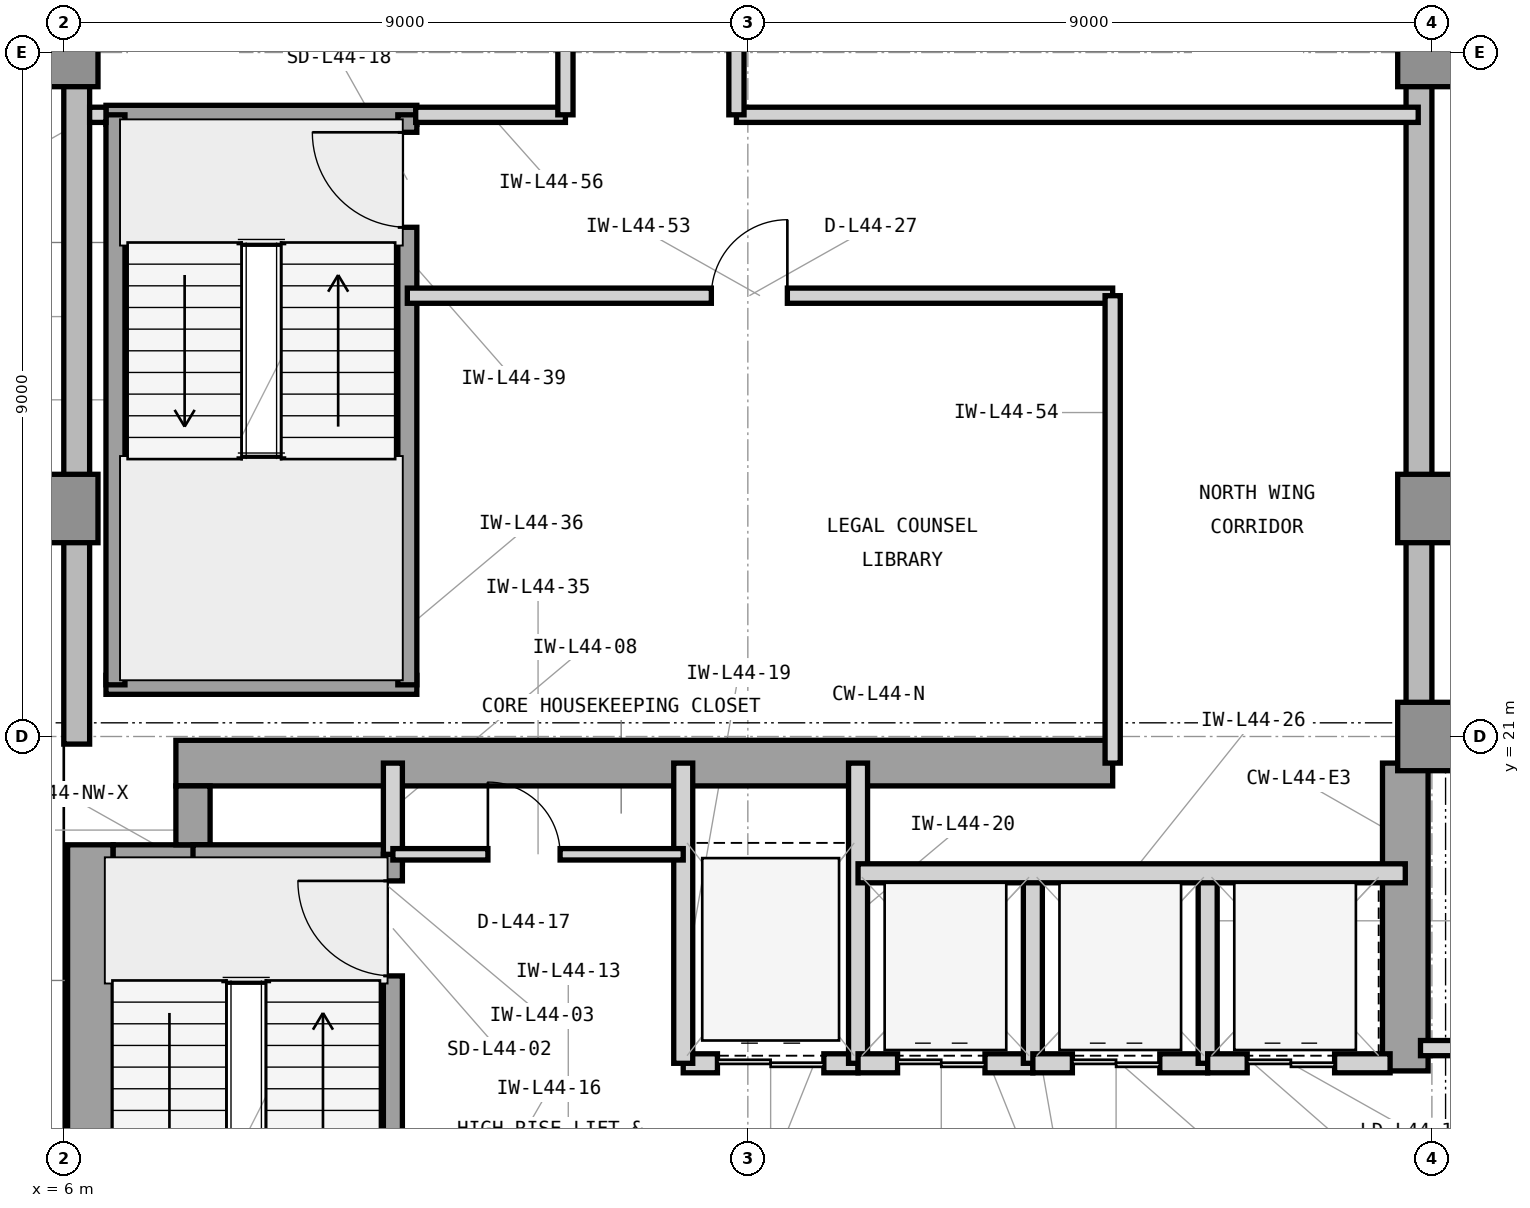
"""IFC4 building model, lengths in metres.
Left out: names, types, materials, properties, quantities, classifications, styles, units other than length and angle.
Written with IfcOpenShell. Run it as: python <this file> out.ifc"""

import sys

from ifc_helpers import new_model, si_unit, direction, frame, frame_2d, origin, origin_2d, place, context, subcontext, project, spatial, rectangle, extrude, element, fill, save


model = new_model("IFC4")
c1 = context("Model", 3, precision=1e-05, world=origin(), true_north=direction((0.0, 1.0)))
c2 = subcontext(c1, "Body", "Model", "MODEL_VIEW")
j1 = project(units=[si_unit("LENGTHUNIT", "METRE"), si_unit("PLANEANGLEUNIT", "RADIAN")], contexts=[c1])
p1 = place(None, origin())
s1 = spatial("IfcSite", under=j1, at=p1, CompositionType="ELEMENT")
p2 = place(p1, origin())
s2 = spatial("IfcBuilding", under=s1, at=p2, CompositionType="ELEMENT")
p3 = place(p2, frame((0.0, 0.0, 183.9)))
s3 = spatial("IfcBuildingStorey", under=s2, at=p3, CompositionType="ELEMENT", Elevation=183.9)
p4 = place(p3, frame((6.35, 4.425, 0.0), z_axis=(0.0, 0.0, 1.0), x_axis=(0.0, 1.0, 0.0)))
e1 = element("IfcWall", 1, at=p4, inside=s3, PredefinedType="SHEAR", context=c2, shape_type="SweptSolid", body=[
    extrude(rectangle(XDim=15.15, YDim=0.6, at=frame_2d((7.575, 0.0))), origin(), (0.0, 0.0, 1.0), 3.9),
])
p5 = place(p3, frame((7.475, 20.65, 0.0), z_axis=(0.0, 0.0, 1.0), x_axis=(1.0, 0.0, 0.0)))
e2 = element("IfcWall", 2, at=p5, inside=s3, PredefinedType="SHEAR", context=c2, shape_type="SweptSolid", body=[
    extrude(rectangle(XDim=12.325, YDim=0.6, at=frame_2d((6.163, 0.0))), origin(), (0.0, 0.0, 1.0), 3.9),
])
p6 = place(p3, frame((23.65, 16.6, 0.0), z_axis=(0.0, 0.0, 1.0), x_axis=(0.0, 1.0, 0.0)))
e3 = element("IfcWall", 3, at=p6, inside=s3, PredefinedType="SHEAR", context=c2, shape_type="SweptSolid", body=[
    extrude(rectangle(XDim=4.05, YDim=0.6, at=frame_2d((2.025, 0.0))), origin(), (0.0, 0.0, 1.0), 3.9),
])
p7 = place(p3, frame((6.65, 19.35, 0.0), z_axis=(0.0, 0.0, 1.0), x_axis=(1.0, 0.0, 0.0)))
e4 = element("IfcWall", 4, at=p7, inside=s3, PredefinedType="SHEAR", context=c2, shape_type="SweptSolid", body=[
    extrude(rectangle(XDim=1.275, YDim=0.45, at=frame_2d((0.638, 0.0))), origin(), (0.0, 0.0, 1.0), 3.9),
])
p8 = place(p3, frame((7.7, 19.575, 0.0), z_axis=(0.0, 0.0, 1.0), x_axis=(0.0, 1.0, 0.0)))
e5 = element("IfcWall", 5, at=p8, inside=s3, PredefinedType="SHEAR", context=c2, shape_type="SweptSolid", body=[
    extrude(rectangle(XDim=0.775, YDim=0.45, at=frame_2d((0.388, 0.0))), origin(), (0.0, 0.0, 1.0), 3.9),
])
for number, where, z_axis, x_axis in (
    (6, (24.0, 21.0, 0.0), (0.0, 0.0, 1.0), (1.0, 0.0, 0.0)),
    (7, (6.0, 24.0, 0.0), (0.0, 0.0, 1.0), (1.0, 0.0, 0.0)),
    (8, (24.0, 24.0, 0.0), (0.0, 0.0, 1.0), (1.0, 0.0, 0.0)),
    (9, (6.0, 30.0, 0.0), (0.0, 0.0, 1.0), (1.0, 0.0, 0.0)),
    (10, (24.0, 30.0, 0.0), (0.0, 0.0, 1.0), (1.0, 0.0, 0.0)),
):
    element("IfcColumn", number, at=place(p3, frame(where, z_axis=z_axis, x_axis=x_axis)), inside=s3, PredefinedType="COLUMN", context=c2, shape_type="SweptSolid", body=[
        extrude(rectangle(XDim=0.9, YDim=0.9, at=origin_2d()), origin(), (0.0, 0.0, 1.0), 3.9),
    ])
p9 = place(p3, frame((55.4, 20.83, 0.0), z_axis=(0.0, 0.0, 1.0), x_axis=(-1.0, 0.0, 0.0)))
e11 = element("IfcWall", 11, at=p9, inside=s3, PredefinedType="STANDARD", context=c2, shape_type="SweptSolid", body=[
    extrude(rectangle(XDim=31.4, YDim=0.34, at=frame_2d((15.7, 0.0))), origin(), (0.0, 0.0, 1.0), 3.7),
])
p10 = place(p9, frame((29.046, 0.0, 0.9)))
e12 = element("IfcOpeningElement", 12, at=p10, cuts=e11, PredefinedType="OPENING", context=c2, shape_type="SweptSolid", body=[
    extrude(rectangle(XDim=1.6, YDim=2.2, at=frame_2d((0.8, 1.1))), frame((0.0, 0.18, 0.0), z_axis=(0.0, -1.0, 0.0), x_axis=(1.0, 0.0, 0.0)), (0.0, 0.0, 1.0), 0.36),
])
p11 = place(p9, frame((10.125, 0.0, 0.9)))
e13 = element("IfcOpeningElement", 13, at=p11, cuts=e11, PredefinedType="OPENING", context=c2, shape_type="SweptSolid", body=[
    extrude(rectangle(XDim=2.3, YDim=2.2, at=frame_2d((1.15, 1.1))), frame((0.0, 0.18, 0.0), z_axis=(0.0, -1.0, 0.0), x_axis=(1.0, 0.0, 0.0)), (0.0, 0.0, 1.0), 0.36),
])
p12 = place(p3, frame((23.83, 21.0, 0.0), z_axis=(0.0, 0.0, 1.0), x_axis=(0.0, 1.0, 0.0)))
e14 = element("IfcWall", 14, at=p12, inside=s3, PredefinedType="STANDARD", context=c2, shape_type="SweptSolid", body=[
    extrude(rectangle(XDim=22.4, YDim=0.34, at=frame_2d((11.2, 0.0))), origin(), (0.0, 0.0, 1.0), 3.7),
])
p13 = place(p12, frame((10.955, 0.0, 0.9)))
e15 = element("IfcOpeningElement", 15, at=p13, cuts=e14, PredefinedType="OPENING", context=c2, shape_type="SweptSolid", body=[
    extrude(rectangle(XDim=2.3, YDim=2.2, at=frame_2d((1.15, 1.1))), frame((0.0, 0.18, 0.0), z_axis=(0.0, -1.0, 0.0), x_axis=(1.0, 0.0, 0.0)), (0.0, 0.0, 1.0), 0.36),
])
p14 = place(p3, frame((6.17, 43.4, 0.0), z_axis=(0.0, 0.0, 1.0), x_axis=(0.0, -1.0, 0.0)))
e16 = element("IfcWall", 16, at=p14, inside=s3, PredefinedType="STANDARD", context=c2, shape_type="SweptSolid", body=[
    extrude(rectangle(XDim=22.5, YDim=0.34, at=frame_2d((11.25, 0.0))), origin(), (0.0, 0.0, 1.0), 3.7),
])
p15 = place(p14, frame((10.1, 0.0, 0.9)))
e17 = element("IfcOpeningElement", 17, at=p15, cuts=e16, PredefinedType="OPENING", context=c2, shape_type="SweptSolid", body=[
    extrude(rectangle(XDim=2.3, YDim=2.2, at=frame_2d((1.15, 1.1))), frame((0.0, 0.18, 0.0), z_axis=(0.0, -1.0, 0.0), x_axis=(1.0, 0.0, 0.0)), (0.0, 0.0, 1.0), 0.36),
])
p16 = place(p3, frame((7.7, 19.45, 0.0), z_axis=(0.0, 0.0, 1.0), x_axis=(1.0, 0.0, 0.0)))
e18 = element("IfcWall", 18, at=p16, inside=s3, PredefinedType="SHEAR", context=c2, shape_type="SweptSolid", body=[
    extrude(rectangle(XDim=2.755, YDim=0.25, at=frame_2d((1.377, 0.0))), origin(), (0.0, 0.0, 1.0), 3.9),
])
p17 = place(p3, frame((10.33, 12.0, 0.0), z_axis=(0.0, 0.0, 1.0), x_axis=(0.0, 1.0, 0.0)))
e19 = element("IfcWall", 19, at=p17, inside=s3, PredefinedType="SHEAR", context=c2, shape_type="SweptSolid", body=[
    extrude(rectangle(XDim=7.45, YDim=0.25, at=frame_2d((3.725, 0.0))), origin(), (0.0, 0.0, 1.0), 3.9),
])
p18 = place(p17, frame((5.85, 0.0, 0.0)))
e20 = element("IfcOpeningElement", 20, at=p18, cuts=e19, PredefinedType="OPENING", context=c2, shape_type="SweptSolid", body=[
    extrude(rectangle(XDim=1.25, YDim=2.2, at=frame_2d((0.625, 1.1))), frame((0.0, 0.135, 0.0), z_axis=(0.0, -1.0, 0.0), x_axis=(1.0, 0.0, 0.0)), (0.0, 0.0, 1.0), 0.27),
])
p19 = place(p3, frame((10.33, 19.45, 0.0), z_axis=(0.0, 0.0, 1.0), x_axis=(0.0, 1.0, 0.0)))
e21 = element("IfcWall", 21, at=p19, inside=s3, PredefinedType="PARTITIONING", context=c2, shape_type="SweptSolid", body=[
    extrude(rectangle(XDim=1.2, YDim=0.25, at=frame_2d((0.6, 0.0))), origin(), (0.0, 0.0, 1.0), 3.073),
])
p20 = place(p3, frame((14.15, 16.7, 0.0), z_axis=(0.0, 0.0, 1.0), x_axis=(1.0, 0.0, 0.0)))
e22 = element("IfcWall", 22, at=p20, inside=s3, PredefinedType="PARTITIONING", context=c2, shape_type="SweptSolid", body=[
    extrude(rectangle(XDim=2.3, YDim=0.25, at=frame_2d((1.15, 0.0))), origin(), (0.0, 0.0, 1.0), 3.283),
])
p21 = place(p20, frame((0.45, 0.0, 0.0)))
e23 = element("IfcOpeningElement", 23, at=p21, cuts=e22, PredefinedType="OPENING", context=c2, shape_type="SweptSolid", body=[
    extrude(rectangle(XDim=1.4, YDim=2.35, at=frame_2d((0.7, 1.175))), frame((0.0, 0.135, 0.0), z_axis=(0.0, -1.0, 0.0), x_axis=(1.0, 0.0, 0.0)), (0.0, 0.0, 1.0), 0.27),
])
for number, where, z_axis, x_axis in (
    (24, (14.15, 16.7, 0.0), (0.0, 0.0, 1.0), (0.0, 1.0, 0.0)),
    (25, (16.45, 16.7, 0.0), (0.0, 0.0, 1.0), (0.0, 1.0, 0.0)),
):
    element("IfcWall", number, at=place(p3, frame(where, z_axis=z_axis, x_axis=x_axis)), inside=s3, PredefinedType="PARTITIONING", context=c2, shape_type="SweptSolid", body=[
        extrude(rectangle(XDim=3.95, YDim=0.25, at=frame_2d((1.975, 0.0))), origin(), (0.0, 0.0, 1.0), 3.69),
    ])
p22 = place(p3, frame((16.45, 16.7, 0.0), z_axis=(0.0, 0.0, 1.0), x_axis=(1.0, 0.0, 0.0)))
e26 = element("IfcWall", 26, at=p22, inside=s3, PredefinedType="PARTITIONING", context=c2, shape_type="SweptSolid", body=[
    extrude(rectangle(XDim=2.3, YDim=0.25, at=frame_2d((1.15, 0.0))), origin(), (0.0, 0.0, 1.0), 3.283),
])
p23 = place(p22, frame((0.52, 0.0, 0.0)))
e27 = element("IfcOpeningElement", 27, at=p23, cuts=e26, PredefinedType="OPENING", context=c2, shape_type="SweptSolid", body=[
    extrude(rectangle(XDim=1.15, YDim=2.25, at=frame_2d((0.575, 1.125))), frame((0.0, 0.135, 0.0), z_axis=(0.0, -1.0, 0.0), x_axis=(1.0, 0.0, 0.0)), (0.0, 0.0, 1.0), 0.27),
])
p24 = place(p3, frame((18.75, 16.7, 0.0), z_axis=(0.0, 0.0, 1.0), x_axis=(0.0, 1.0, 0.0)))
e28 = element("IfcWall", 28, at=p24, inside=s3, PredefinedType="PARTITIONING", context=c2, shape_type="SweptSolid", body=[
    extrude(rectangle(XDim=2.5, YDim=0.25, at=frame_2d((1.25, 0.0))), origin(), (0.0, 0.0, 1.0), 3.69),
])
p25 = place(p3, frame((18.75, 16.7, 0.0), z_axis=(0.0, 0.0, 1.0), x_axis=(1.0, 0.0, 0.0)))
e29 = element("IfcWall", 29, at=p25, inside=s3, PredefinedType="PARTITIONING", context=c2, shape_type="SweptSolid", body=[
    extrude(rectangle(XDim=2.3, YDim=0.25, at=frame_2d((1.15, 0.0))), origin(), (0.0, 0.0, 1.0), 3.283),
])
p26 = place(p25, frame((0.52, 0.0, 0.0)))
e30 = element("IfcOpeningElement", 30, at=p26, cuts=e29, PredefinedType="OPENING", context=c2, shape_type="SweptSolid", body=[
    extrude(rectangle(XDim=1.15, YDim=2.25, at=frame_2d((0.575, 1.125))), frame((0.0, 0.135, 0.0), z_axis=(0.0, -1.0, 0.0), x_axis=(1.0, 0.0, 0.0)), (0.0, 0.0, 1.0), 0.27),
])
p27 = place(p3, frame((21.05, 16.7, 0.0), z_axis=(0.0, 0.0, 1.0), x_axis=(0.0, 1.0, 0.0)))
e31 = element("IfcWall", 31, at=p27, inside=s3, PredefinedType="PARTITIONING", context=c2, shape_type="SweptSolid", body=[
    extrude(rectangle(XDim=2.5, YDim=0.25, at=frame_2d((1.25, 0.0))), origin(), (0.0, 0.0, 1.0), 3.69),
])
p28 = place(p3, frame((21.05, 16.7, 0.0), z_axis=(0.0, 0.0, 1.0), x_axis=(1.0, 0.0, 0.0)))
e32 = element("IfcWall", 32, at=p28, inside=s3, PredefinedType="PARTITIONING", context=c2, shape_type="SweptSolid", body=[
    extrude(rectangle(XDim=2.4, YDim=0.25, at=frame_2d((1.2, 0.0))), origin(), (0.0, 0.0, 1.0), 3.283),
])
p29 = place(p28, frame((0.52, 0.0, 0.0)))
e33 = element("IfcOpeningElement", 33, at=p29, cuts=e32, PredefinedType="OPENING", context=c2, shape_type="SweptSolid", body=[
    extrude(rectangle(XDim=1.15, YDim=2.25, at=frame_2d((0.575, 1.125))), frame((0.0, 0.135, 0.0), z_axis=(0.0, -1.0, 0.0), x_axis=(1.0, 0.0, 0.0)), (0.0, 0.0, 1.0), 0.27),
])
p30 = place(p3, frame((16.45, 19.2, 0.0), z_axis=(0.0, 0.0, 1.0), x_axis=(1.0, 0.0, 0.0)))
e34 = element("IfcWall", 34, at=p30, inside=s3, PredefinedType="PARTITIONING", context=c2, shape_type="SweptSolid", body=[
    extrude(rectangle(XDim=7.2, YDim=0.25, at=frame_2d((3.6, 0.0))), origin(), (0.0, 0.0, 1.0), 3.69),
])
p31 = place(p3, frame((10.33, 19.45, 0.0), z_axis=(0.0, 0.0, 1.0), x_axis=(1.0, 0.0, 0.0)))
e35 = element("IfcWall", 35, at=p31, inside=s3, PredefinedType="PARTITIONING", context=c2, shape_type="SweptSolid", body=[
    extrude(rectangle(XDim=3.82, YDim=0.15, at=frame_2d((1.91, 0.0))), origin(), (0.0, 0.0, 1.0), 3.69),
])
p32 = place(p31, frame((1.25, 0.0, 0.0)))
e36 = element("IfcOpeningElement", 36, at=p32, cuts=e35, PredefinedType="OPENING", context=c2, shape_type="SweptSolid", body=[
    extrude(rectangle(XDim=0.95, YDim=2.1, at=frame_2d((0.475, 1.05))), frame((0.0, 0.085, 0.0), z_axis=(0.0, -1.0, 0.0), x_axis=(1.0, 0.0, 0.0)), (0.0, 0.0, 1.0), 0.17),
])
for number, where, z_axis, x_axis in (
    (37, (6.555, 21.68, 0.0), (0.0, 0.0, 1.0), (1.0, 0.0, 0.0)),
    (38, (6.555, 29.18, 0.0), (0.0, 0.0, 1.0), (1.0, 0.0, 0.0)),
):
    element("IfcWall", number, at=place(p3, frame(where, z_axis=z_axis, x_axis=x_axis)), inside=s3, PredefinedType="SHEAR", context=c2, shape_type="SweptSolid", body=[
        extrude(rectangle(XDim=4.09, YDim=0.25, at=frame_2d((2.045, 0.0))), origin(), (0.0, 0.0, 1.0), 3.9),
    ])
p33 = place(p3, frame((6.68, 21.68, 0.0), z_axis=(0.0, 0.0, 1.0), x_axis=(0.0, 1.0, 0.0)))
e39 = element("IfcWall", 39, at=p33, inside=s3, PredefinedType="SHEAR", context=c2, shape_type="SweptSolid", body=[
    extrude(rectangle(XDim=7.5, YDim=0.25, at=frame_2d((3.75, 0.0))), origin(), (0.0, 0.0, 1.0), 3.9),
])
p34 = place(p3, frame((10.52, 21.68, 0.0), z_axis=(0.0, 0.0, 1.0), x_axis=(0.0, 1.0, 0.0)))
e40 = element("IfcWall", 40, at=p34, inside=s3, PredefinedType="SHEAR", context=c2, shape_type="SweptSolid", body=[
    extrude(rectangle(XDim=7.5, YDim=0.25, at=frame_2d((3.75, 0.0))), origin(), (0.0, 0.0, 1.0), 3.9),
])
p35 = place(p34, frame((6.02, 0.0, 0.0)))
e41 = element("IfcOpeningElement", 41, at=p35, cuts=e40, PredefinedType="OPENING", context=c2, shape_type="SweptSolid", body=[
    extrude(rectangle(XDim=1.25, YDim=2.2, at=frame_2d((0.625, 1.1))), frame((0.0, 0.135, 0.0), z_axis=(0.0, -1.0, 0.0), x_axis=(1.0, 0.0, 0.0)), (0.0, 0.0, 1.0), 0.27),
])
p36 = place(p3, frame((23.85, 16.9, 0.0), z_axis=(0.0, 0.0, 1.0), x_axis=(1.0, 0.0, 0.0)))
e42 = element("IfcWall", 42, at=p36, inside=s3, PredefinedType="PARTITIONING", context=c2, shape_type="SweptSolid", body=[
    extrude(rectangle(XDim=2.85, YDim=0.2, at=frame_2d((1.425, 0.0))), origin(), (0.0, 0.0, 1.0), 3.69),
])
p37 = place(p36, frame((0.7, 0.0, 0.0)))
e43 = element("IfcOpeningElement", 43, at=p37, cuts=e42, PredefinedType="OPENING", context=c2, shape_type="SweptSolid", body=[
    extrude(rectangle(XDim=1.0, YDim=2.15, at=frame_2d((0.5, 1.075))), frame((0.0, 0.11, 0.0), z_axis=(0.0, -1.0, 0.0), x_axis=(1.0, 0.0, 0.0)), (0.0, 0.0, 1.0), 0.22),
])
p38 = place(p3, frame((10.52, 26.8, 0.0), z_axis=(0.0, 0.0, 1.0), x_axis=(1.0, 0.0, 0.0)))
e44 = element("IfcWall", 44, at=p38, inside=s3, PredefinedType="PARTITIONING", context=c2, shape_type="SweptSolid", body=[
    extrude(rectangle(XDim=9.28, YDim=0.2, at=frame_2d((4.64, 0.0))), origin(), (0.0, 0.0, 1.0), 3.69),
])
p39 = place(p38, frame((4.0, 0.0, 0.0)))
e45 = element("IfcOpeningElement", 45, at=p39, cuts=e44, PredefinedType="OPENING", context=c2, shape_type="SweptSolid", body=[
    extrude(rectangle(XDim=1.0, YDim=2.15, at=frame_2d((0.5, 1.075))), frame((0.0, 0.11, 0.0), z_axis=(0.0, -1.0, 0.0), x_axis=(1.0, 0.0, 0.0)), (0.0, 0.0, 1.0), 0.22),
])
p40 = place(p3, frame((19.8, 20.65, 0.0), z_axis=(0.0, 0.0, 1.0), x_axis=(0.0, 1.0, 0.0)))
e46 = element("IfcWall", 46, at=p40, inside=s3, PredefinedType="PARTITIONING", context=c2, shape_type="SweptSolid", body=[
    extrude(rectangle(XDim=6.15, YDim=0.2, at=frame_2d((3.075, 0.0))), origin(), (0.0, 0.0, 1.0), 3.69),
])
p41 = place(p3, frame((6.34, 29.18, 0.0), z_axis=(0.0, 0.0, 1.0), x_axis=(1.0, 0.0, 0.0)))
e47 = element("IfcWall", 47, at=p41, inside=s3, PredefinedType="PARTITIONING", context=c2, shape_type="SweptSolid", body=[
    extrude(rectangle(XDim=0.215, YDim=0.2, at=frame_2d((0.107, 0.0))), origin(), (0.0, 0.0, 1.0), 3.69),
])
p42 = place(p3, frame((10.63, 29.18, 0.0), z_axis=(0.0, 0.0, 1.0), x_axis=(1.0, 0.0, 0.0)))
e48 = element("IfcWall", 48, at=p42, inside=s3, PredefinedType="PARTITIONING", context=c2, shape_type="SweptSolid", body=[
    extrude(rectangle(XDim=1.97, YDim=0.2, at=frame_2d((0.985, 0.0))), origin(), (0.0, 0.0, 1.0), 3.69),
])
p43 = place(p3, frame((14.85, 29.18, 0.0), z_axis=(0.0, 0.0, 1.0), x_axis=(1.0, 0.0, 0.0)))
e49 = element("IfcWall", 49, at=p43, inside=s3, PredefinedType="PARTITIONING", context=c2, shape_type="SweptSolid", body=[
    extrude(rectangle(XDim=8.97, YDim=0.2, at=frame_2d((4.485, 0.0))), origin(), (0.0, 0.0, 1.0), 3.69),
])
p44 = place(p3, frame((12.6, 29.18, 0.0), z_axis=(0.0, 0.0, 1.0), x_axis=(0.0, 1.0, 0.0)))
e50 = element("IfcWall", 50, at=p44, inside=s3, PredefinedType="PARTITIONING", context=c2, shape_type="SweptSolid", body=[
    extrude(rectangle(XDim=7.82, YDim=0.2, at=frame_2d((3.91, 0.0))), origin(), (0.0, 0.0, 1.0), 3.69),
])
p45 = place(p44, frame((3.41, 0.0, 0.0)))
e51 = element("IfcOpeningElement", 51, at=p45, cuts=e50, PredefinedType="OPENING", context=c2, shape_type="SweptSolid", body=[
    extrude(rectangle(XDim=1.0, YDim=2.15, at=frame_2d((0.5, 1.075))), frame((0.0, 0.11, 0.0), z_axis=(0.0, -1.0, 0.0), x_axis=(1.0, 0.0, 0.0)), (0.0, 0.0, 1.0), 0.22),
])
p46 = place(p3, frame((14.85, 29.18, 0.0), z_axis=(0.0, 0.0, 1.0), x_axis=(0.0, 1.0, 0.0)))
e52 = element("IfcWall", 52, at=p46, inside=s3, PredefinedType="PARTITIONING", context=c2, shape_type="SweptSolid", body=[
    extrude(rectangle(XDim=7.82, YDim=0.2, at=frame_2d((3.91, 0.0))), origin(), (0.0, 0.0, 1.0), 3.69),
])
p47 = place(p46, frame((3.41, 0.0, 0.0)))
e53 = element("IfcOpeningElement", 53, at=p47, cuts=e52, PredefinedType="OPENING", context=c2, shape_type="SweptSolid", body=[
    extrude(rectangle(XDim=1.0, YDim=2.15, at=frame_2d((0.5, 1.075))), frame((0.0, 0.11, 0.0), z_axis=(0.0, -1.0, 0.0), x_axis=(1.0, 0.0, 0.0)), (0.0, 0.0, 1.0), 0.22),
])
p48 = place(p18, origin())
e54 = element("IfcDoor", 54, at=p48, inside=s3, OperationType="SINGLE_SWING_RIGHT", PredefinedType="DOOR", context=c2, shape_type="SweptSolid", body=[
    extrude(rectangle(XDim=1.25, YDim=2.2, at=frame_2d((0.625, 1.1))), frame((0.0, 0.025, 0.0), z_axis=(0.0, -1.0, 0.0), x_axis=(1.0, 0.0, 0.0)), (0.0, 0.0, 1.0), 0.05),
])
fill(e20, e54)
p49 = place(p21, origin())
e55 = element("IfcDoor", 55, at=p49, inside=s3, OperationType="DOUBLE_DOOR_SLIDING", PredefinedType="DOOR", context=c2, shape_type="SweptSolid", body=[
    extrude(rectangle(XDim=1.4, YDim=2.35, at=frame_2d((0.7, 1.175))), frame((0.0, 0.025, 0.0), z_axis=(0.0, -1.0, 0.0), x_axis=(1.0, 0.0, 0.0)), (0.0, 0.0, 1.0), 0.05),
])
fill(e23, e55)
p50 = place(p23, origin())
e56 = element("IfcDoor", 56, at=p50, inside=s3, OperationType="DOUBLE_DOOR_SLIDING", PredefinedType="DOOR", context=c2, shape_type="SweptSolid", body=[
    extrude(rectangle(XDim=1.15, YDim=2.25, at=frame_2d((0.575, 1.125))), frame((0.0, 0.025, 0.0), z_axis=(0.0, -1.0, 0.0), x_axis=(1.0, 0.0, 0.0)), (0.0, 0.0, 1.0), 0.05),
])
fill(e27, e56)
p51 = place(p26, origin())
e57 = element("IfcDoor", 57, at=p51, inside=s3, OperationType="DOUBLE_DOOR_SLIDING", PredefinedType="DOOR", context=c2, shape_type="SweptSolid", body=[
    extrude(rectangle(XDim=1.15, YDim=2.25, at=frame_2d((0.575, 1.125))), frame((0.0, 0.025, 0.0), z_axis=(0.0, -1.0, 0.0), x_axis=(1.0, 0.0, 0.0)), (0.0, 0.0, 1.0), 0.05),
])
fill(e30, e57)
p52 = place(p29, origin())
e58 = element("IfcDoor", 58, at=p52, inside=s3, OperationType="DOUBLE_DOOR_SLIDING", PredefinedType="DOOR", context=c2, shape_type="SweptSolid", body=[
    extrude(rectangle(XDim=1.15, YDim=2.25, at=frame_2d((0.575, 1.125))), frame((0.0, 0.025, 0.0), z_axis=(0.0, -1.0, 0.0), x_axis=(1.0, 0.0, 0.0)), (0.0, 0.0, 1.0), 0.05),
])
fill(e33, e58)
p53 = place(p32, origin())
e59 = element("IfcDoor", 59, at=p53, inside=s3, OperationType="SINGLE_SWING_LEFT", PredefinedType="DOOR", context=c2, shape_type="SweptSolid", body=[
    extrude(rectangle(XDim=0.95, YDim=2.1, at=frame_2d((0.475, 1.05))), frame((0.0, 0.025, 0.0), z_axis=(0.0, -1.0, 0.0), x_axis=(1.0, 0.0, 0.0)), (0.0, 0.0, 1.0), 0.05),
])
fill(e36, e59)
p54 = place(p35, origin())
e60 = element("IfcDoor", 60, at=p54, inside=s3, OperationType="SINGLE_SWING_RIGHT", PredefinedType="DOOR", context=c2, shape_type="SweptSolid", body=[
    extrude(rectangle(XDim=1.25, YDim=2.2, at=frame_2d((0.625, 1.1))), frame((0.0, 0.025, 0.0), z_axis=(0.0, -1.0, 0.0), x_axis=(1.0, 0.0, 0.0)), (0.0, 0.0, 1.0), 0.05),
])
fill(e41, e60)
p55 = place(p39, origin())
e61 = element("IfcDoor", 61, at=p55, inside=s3, OperationType="SINGLE_SWING_RIGHT", PredefinedType="DOOR", context=c2, shape_type="SweptSolid", body=[
    extrude(rectangle(XDim=1.0, YDim=2.15, at=frame_2d((0.5, 1.075))), frame((0.0, 0.025, 0.0), z_axis=(0.0, -1.0, 0.0), x_axis=(1.0, 0.0, 0.0)), (0.0, 0.0, 1.0), 0.05),
])
fill(e45, e61)
save(model, sys.argv[1])
